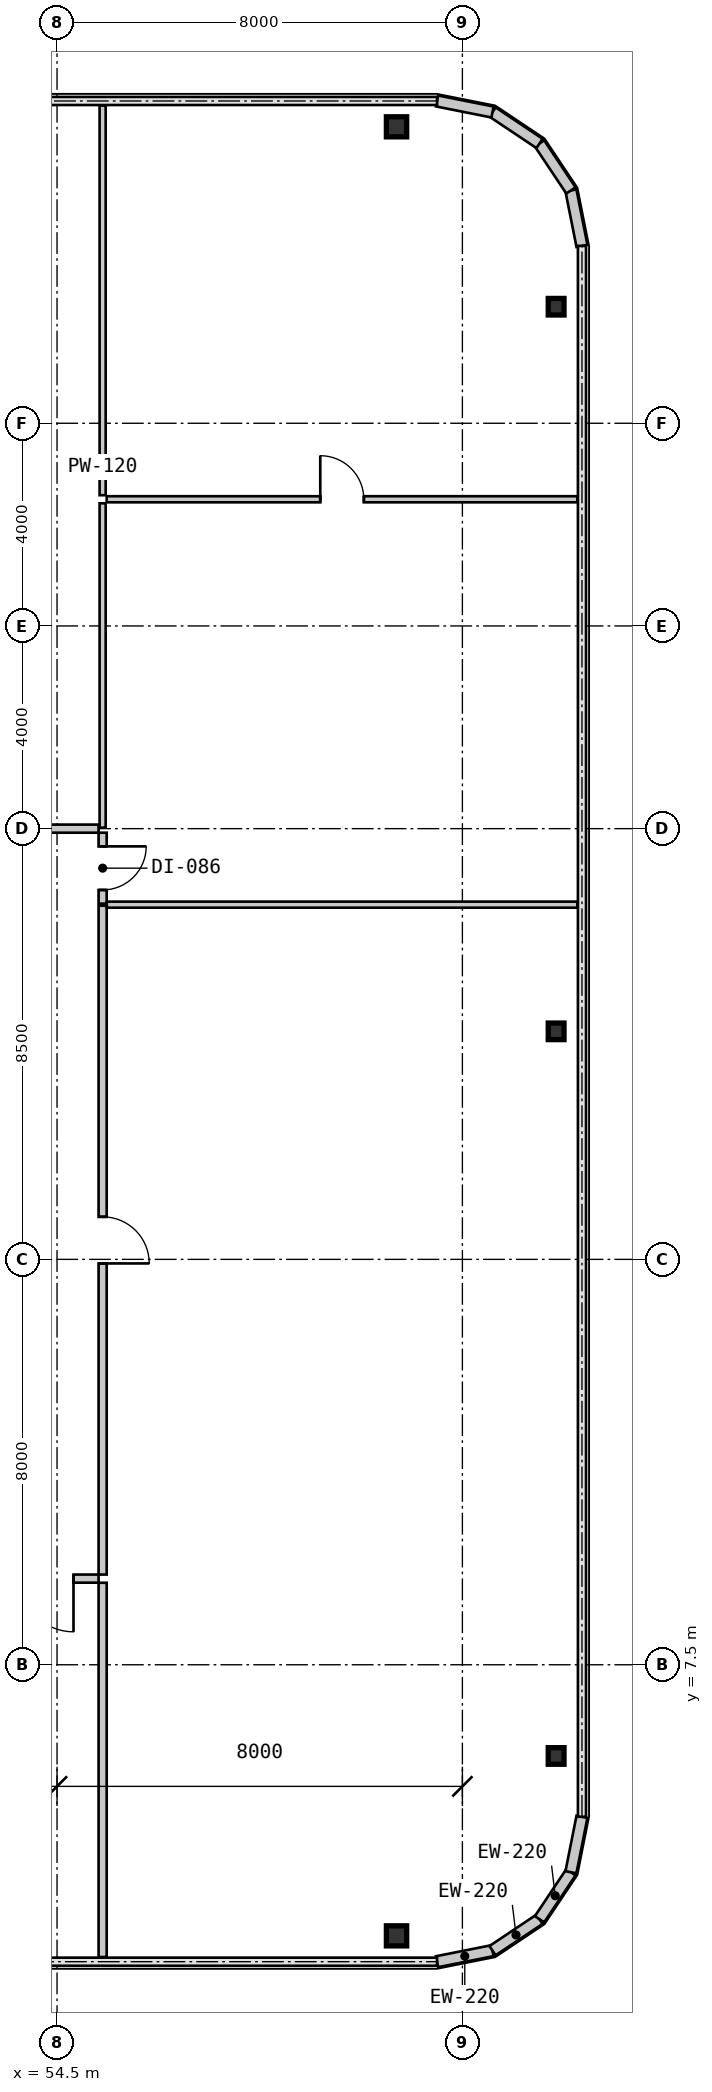
"""IFC4 building model, lengths in metres.
Left out: names, types, materials, properties, quantities, classifications, styles, units other than length and angle.
Written with IfcOpenShell. Run it as: python <this file> out.ifc"""

import sys

from ifc_helpers import new_model, si_unit, direction, frame, frame_2d, origin, origin_2d, place, context, subcontext, project, spatial, rectangle, i_section, extrude, source, transform, mapped, element, fill, save


model = new_model("IFC4")
c1 = context("Model", 3, precision=1e-05, world=origin(), true_north=direction((0.0, 1.0)))
c2 = subcontext(c1, "Body", "Model", "MODEL_VIEW")
j1 = project(units=[si_unit("LENGTHUNIT", "METRE"), si_unit("PLANEANGLEUNIT", "RADIAN")], contexts=[c1])
p1 = place(None, origin())
s1 = spatial("IfcSite", under=j1, at=p1, CompositionType="ELEMENT")
p2 = place(p1, origin())
s2 = spatial("IfcBuilding", under=s1, at=p2, CompositionType="ELEMENT")
p3 = place(p2, frame((0.0, 0.0, 32.55)))
s3 = spatial("IfcBuildingStorey", under=s2, at=p3, CompositionType="ELEMENT", Elevation=32.55)
m1 = source(origin(), c2, "Body", "SweptSolid", [
    extrude(i_section(OverallWidth=0.4, OverallDepth=0.396, WebThickness=0.022, FlangeThickness=0.034, at=origin_2d()), origin(), (0.0, 0.0, 1.0), 3.15),
])
for number, where, z_axis, x_axis in (
    (1, (61.2, 2.15, 0.0), (0.0, 0.0, 1.0), (1.0, 0.0, 0.0)),
    (2, (61.2, 37.85, 0.0), (0.0, 0.0, 1.0), (1.0, 0.0, 0.0)),
):
    element("IfcColumn", number, at=place(p3, frame(where, z_axis=z_axis, x_axis=x_axis)), inside=s3, PredefinedType="COLUMN", context=c2, shape_type="MappedRepresentation", body=[
        mapped(m1, transform((0.0, 0.0, 0.0), scale=1.0)),
    ])
m2 = source(origin(), c2, "Body", "SweptSolid", [
    extrude(i_section(OverallWidth=0.311, OverallDepth=0.327, WebThickness=0.016, FlangeThickness=0.025, at=origin_2d()), origin(), (0.0, 0.0, 1.0), 3.15),
])
for number, where, z_axis, x_axis in (
    (3, (64.35, 5.7, 0.0), (0.0, 0.0, 1.0), (1.0, 0.0, 0.0)),
    (4, (64.35, 20.0, 0.0), (0.0, 0.0, 1.0), (1.0, 0.0, 0.0)),
    (5, (64.35, 34.3, 0.0), (0.0, 0.0, 1.0), (1.0, 0.0, 0.0)),
):
    element("IfcColumn", number, at=place(p3, frame(where, z_axis=z_axis, x_axis=x_axis)), inside=s3, PredefinedType="COLUMN", context=c2, shape_type="MappedRepresentation", body=[
        mapped(m2, transform((0.0, 0.0, 0.0), scale=1.0)),
    ])
m3 = source(origin(), c2, "Body", "SweptSolid", [
    extrude(rectangle(XDim=1.116, YDim=0.22, at=frame_2d((0.558, 0.0))), origin(), (0.0, 0.0, 1.0), 2.93),
])
for number, where, z_axis, x_axis in (
    (6, (62.0, 1.64, 0.0), (0.0, 0.0, 1.0), (0.981, 0.195, 0.0)),
    (7, (63.094, 1.858, 0.0), (0.0, 0.0, 1.0), (0.831, 0.556, 0.0)),
    (8, (64.022, 2.478, 0.0), (0.0, 0.0, 1.0), (0.556, 0.831, 0.0)),
    (9, (64.642, 3.406, 0.0), (0.0, 0.0, 1.0), (0.195, 0.981, 0.0)),
    (10, (64.86, 35.5, 0.0), (0.0, 0.0, 1.0), (-0.195, 0.981, 0.0)),
    (11, (64.642, 36.594, 0.0), (0.0, 0.0, 1.0), (-0.556, 0.831, 0.0)),
    (12, (64.022, 37.522, 0.0), (0.0, 0.0, 1.0), (-0.831, 0.556, 0.0)),
    (13, (63.094, 38.142, 0.0), (0.0, 0.0, 1.0), (-0.981, 0.195, 0.0)),
):
    element("IfcWall", number, at=place(p3, frame(where, z_axis=z_axis, x_axis=x_axis)), inside=s3, PredefinedType="SOLIDWALL", context=c2, shape_type="MappedRepresentation", body=[
        mapped(m3, transform((0.0, 0.0, 0.0), scale=1.0)),
    ])
m4 = source(origin(), c2, "Body", "SweptSolid", [
    extrude(rectangle(XDim=2.04, YDim=0.16, at=frame_2d((1.02, 0.0))), origin(), (0.0, 0.0, 1.0), 2.93),
])
p4 = place(p3, frame((55.32, 9.2, 0.0), z_axis=(0.0, 0.0, 1.0), x_axis=(-1.0, 0.0, 0.0)))
e14 = element("IfcWall", 14, at=p4, inside=s3, PredefinedType="PARTITIONING", context=c2, shape_type="MappedRepresentation", body=[
    mapped(m4, transform((0.0, 0.0, 0.0), scale=1.0)),
])
m5 = source(origin(), c2, "Body", "SweptSolid", [
    extrude(rectangle(XDim=1.05, YDim=2.1, at=frame_2d((0.525, 1.05))), frame((0.0, 0.09, 0.0), z_axis=(0.0, -1.0, 0.0), x_axis=(1.0, 0.0, 0.0)), (0.0, 0.0, 1.0), 0.18),
])
p5 = place(p4, frame((0.495, 0.0, 0.0)))
e15 = element("IfcOpeningElement", 15, at=p5, cuts=e14, PredefinedType="OPENING", context=c2, shape_type="MappedRepresentation", body=[
    mapped(m5, transform((0.0, 0.0, 0.0), scale=1.0)),
])
m6 = source(origin(), c2, "Body", "SweptSolid", [
    extrude(rectangle(XDim=13.2, YDim=0.16, at=frame_2d((6.6, 0.0))), origin(), (0.0, 0.0, 1.0), 2.93),
])
p6 = place(p3, frame((55.4, 22.48, 0.0), z_axis=(0.0, 0.0, 1.0), x_axis=(0.0, -1.0, 0.0)))
e16 = element("IfcWall", 16, at=p6, inside=s3, PredefinedType="PARTITIONING", context=c2, shape_type="MappedRepresentation", body=[
    mapped(m6, transform((0.0, 0.0, 0.0), scale=1.0)),
])
m7 = source(origin(), c2, "Body", "SweptSolid", [
    extrude(rectangle(XDim=0.92, YDim=2.1, at=frame_2d((0.46, 1.05))), frame((0.0, 0.09, 0.0), z_axis=(0.0, -1.0, 0.0), x_axis=(1.0, 0.0, 0.0)), (0.0, 0.0, 1.0), 0.18),
])
p7 = place(p6, frame((6.14, 0.0, 0.0)))
e17 = element("IfcOpeningElement", 17, at=p7, cuts=e16, PredefinedType="OPENING", context=c2, shape_type="MappedRepresentation", body=[
    mapped(m7, transform((0.0, 0.0, 0.0), scale=1.0)),
])
m8 = source(origin(), c2, "Body", "SweptSolid", [
    extrude(rectangle(XDim=1.4, YDim=0.16, at=frame_2d((0.7, 0.0))), origin(), (0.0, 0.0, 1.0), 2.93),
])
p8 = place(p3, frame((55.4, 23.92, 0.0), z_axis=(0.0, 0.0, 1.0), x_axis=(0.0, -1.0, 0.0)))
e18 = element("IfcWall", 18, at=p8, inside=s3, PredefinedType="PARTITIONING", context=c2, shape_type="MappedRepresentation", body=[
    mapped(m8, transform((0.0, 0.0, 0.0), scale=1.0)),
])
m9 = source(origin(), c2, "Body", "SweptSolid", [
    extrude(rectangle(XDim=0.86, YDim=2.1, at=frame_2d((0.43, 1.05))), frame((0.0, 0.09, 0.0), z_axis=(0.0, -1.0, 0.0), x_axis=(1.0, 0.0, 0.0)), (0.0, 0.0, 1.0), 0.18),
])
p9 = place(p8, frame((0.27, 0.0, 0.0)))
e19 = element("IfcOpeningElement", 19, at=p9, cuts=e18, PredefinedType="OPENING", context=c2, shape_type="MappedRepresentation", body=[
    mapped(m9, transform((0.0, 0.0, 0.0), scale=1.0)),
])
m10 = source(origin(), c2, "Body", "SweptSolid", [
    extrude(rectangle(XDim=4.13, YDim=0.16, at=frame_2d((2.065, 0.0))), origin(), (0.0, 0.0, 1.0), 2.93),
])
p10 = place(p3, frame((51.19, 24.0, 0.0), z_axis=(0.0, 0.0, 1.0), x_axis=(1.0, 0.0, 0.0)))
e20 = element("IfcWall", 20, at=p10, inside=s3, PredefinedType="PARTITIONING", context=c2, shape_type="MappedRepresentation", body=[
    mapped(m10, transform((0.0, 0.0, 0.0), scale=1.0)),
])
m11 = source(origin(), c2, "Body", "SweptSolid", [
    extrude(rectangle(XDim=7.386, YDim=0.16, at=frame_2d((3.693, 0.0))), origin(), (0.0, 0.0, 1.0), 2.93),
])
p11 = place(p3, frame((55.4, 9.118, 0.0), z_axis=(0.0, 0.0, 1.0), x_axis=(0.0, -1.0, 0.0)))
e21 = element("IfcWall", 21, at=p11, inside=s3, PredefinedType="PARTITIONING", context=c2, shape_type="MappedRepresentation", body=[
    mapped(m11, transform((0.0, 0.0, 0.0), scale=1.0)),
])
m12 = source(origin(), c2, "Body", "SweptSolid", [
    extrude(rectangle(XDim=9.286, YDim=0.12, at=frame_2d((4.643, 0.0))), origin(), (0.0, 0.0, 1.0), 2.93),
])
p12 = place(p3, frame((55.482, 22.5, 0.0), z_axis=(0.0, 0.0, 1.0), x_axis=(1.0, 0.0, 0.0)))
e22 = element("IfcWall", 22, at=p12, inside=s3, PredefinedType="PARTITIONING", context=c2, shape_type="MappedRepresentation", body=[
    mapped(m12, transform((0.0, 0.0, 0.0), scale=1.0)),
])
m13 = source(origin(), c2, "Body", "SweptSolid", [
    extrude(rectangle(XDim=9.29, YDim=0.12, at=frame_2d((4.645, 0.0))), origin(), (0.0, 0.0, 1.0), 2.93),
])
p13 = place(p3, frame((55.48, 30.5, 0.0), z_axis=(0.0, 0.0, 1.0), x_axis=(1.0, 0.0, 0.0)))
e23 = element("IfcWall", 23, at=p13, inside=s3, PredefinedType="PARTITIONING", context=c2, shape_type="MappedRepresentation", body=[
    mapped(m13, transform((0.0, 0.0, 0.0), scale=1.0)),
])
m14 = source(origin(), c2, "Body", "SweptSolid", [
    extrude(rectangle(XDim=0.86, YDim=2.1, at=frame_2d((0.43, 1.05))), frame((0.0, 0.07, 0.0), z_axis=(0.0, -1.0, 0.0), x_axis=(1.0, 0.0, 0.0)), (0.0, 0.0, 1.0), 0.14),
])
p14 = place(p13, frame((4.215, 0.0, 0.0)))
e24 = element("IfcOpeningElement", 24, at=p14, cuts=e23, PredefinedType="OPENING", context=c2, shape_type="MappedRepresentation", body=[
    mapped(m14, transform((0.0, 0.0, 0.0), scale=1.0)),
])
m15 = source(origin(), c2, "Body", "SweptSolid", [
    extrude(rectangle(XDim=6.4, YDim=0.12, at=frame_2d((3.2, 0.0))), origin(), (0.0, 0.0, 1.0), 2.93),
])
p15 = place(p3, frame((55.4, 24.02, 0.0), z_axis=(0.0, 0.0, 1.0), x_axis=(0.0, 1.0, 0.0)))
e25 = element("IfcWall", 25, at=p15, inside=s3, PredefinedType="PARTITIONING", context=c2, shape_type="MappedRepresentation", body=[
    mapped(m15, transform((0.0, 0.0, 0.0), scale=1.0)),
])
m16 = source(origin(), c2, "Body", "SweptSolid", [
    extrude(rectangle(XDim=7.69, YDim=0.12, at=frame_2d((3.845, 0.0))), origin(), (0.0, 0.0, 1.0), 2.93),
])
p16 = place(p3, frame((55.4, 30.58, 0.0), z_axis=(0.0, 0.0, 1.0), x_axis=(0.0, 1.0, 0.0)))
e26 = element("IfcWall", 26, at=p16, inside=s3, PredefinedType="PARTITIONING", context=c2, shape_type="MappedRepresentation", body=[
    mapped(m16, transform((0.0, 0.0, 0.0), scale=1.0)),
])
m17 = source(origin(), c2, "Body", "SweptSolid", [
    extrude(rectangle(XDim=1.05, YDim=2.1, at=frame_2d((0.525, 1.05))), frame((0.0, 0.025, 0.0), z_axis=(0.0, -1.0, 0.0), x_axis=(1.0, 0.0, 0.0)), (0.0, 0.0, 1.0), 0.05),
])
p17 = place(p5, origin())
e27 = element("IfcDoor", 27, at=p17, inside=s3, OperationType="SINGLE_SWING_LEFT", PredefinedType="DOOR", context=c2, shape_type="MappedRepresentation", body=[
    mapped(m17, transform((0.0, 0.0, 0.0), scale=1.0)),
])
fill(e15, e27)
m18 = source(origin(), c2, "Body", "SweptSolid", [
    extrude(rectangle(XDim=0.92, YDim=2.1, at=frame_2d((0.46, 1.05))), frame((0.0, 0.025, 0.0), z_axis=(0.0, -1.0, 0.0), x_axis=(1.0, 0.0, 0.0)), (0.0, 0.0, 1.0), 0.05),
])
p18 = place(p7, origin())
e28 = element("IfcDoor", 28, at=p18, inside=s3, OperationType="SINGLE_SWING_RIGHT", PredefinedType="DOOR", context=c2, shape_type="MappedRepresentation", body=[
    mapped(m18, transform((0.0, 0.0, 0.0), scale=1.0)),
])
fill(e17, e28)
m19 = source(origin(), c2, "Body", "SweptSolid", [
    extrude(rectangle(XDim=0.86, YDim=2.1, at=frame_2d((0.43, 1.05))), frame((0.0, 0.025, 0.0), z_axis=(0.0, -1.0, 0.0), x_axis=(1.0, 0.0, 0.0)), (0.0, 0.0, 1.0), 0.05),
])
p19 = place(p9, origin())
e29 = element("IfcDoor", 29, at=p19, inside=s3, OperationType="SINGLE_SWING_LEFT", PredefinedType="DOOR", context=c2, shape_type="MappedRepresentation", body=[
    mapped(m19, transform((0.0, 0.0, 0.0), scale=1.0)),
])
fill(e19, e29)
p20 = place(p14, origin())
e30 = element("IfcDoor", 30, at=p20, inside=s3, OperationType="SINGLE_SWING_LEFT", PredefinedType="DOOR", context=c2, shape_type="MappedRepresentation", body=[
    mapped(m19, transform((0.0, 0.0, 0.0), scale=1.0)),
])
fill(e24, e30)
save(model, sys.argv[1])
